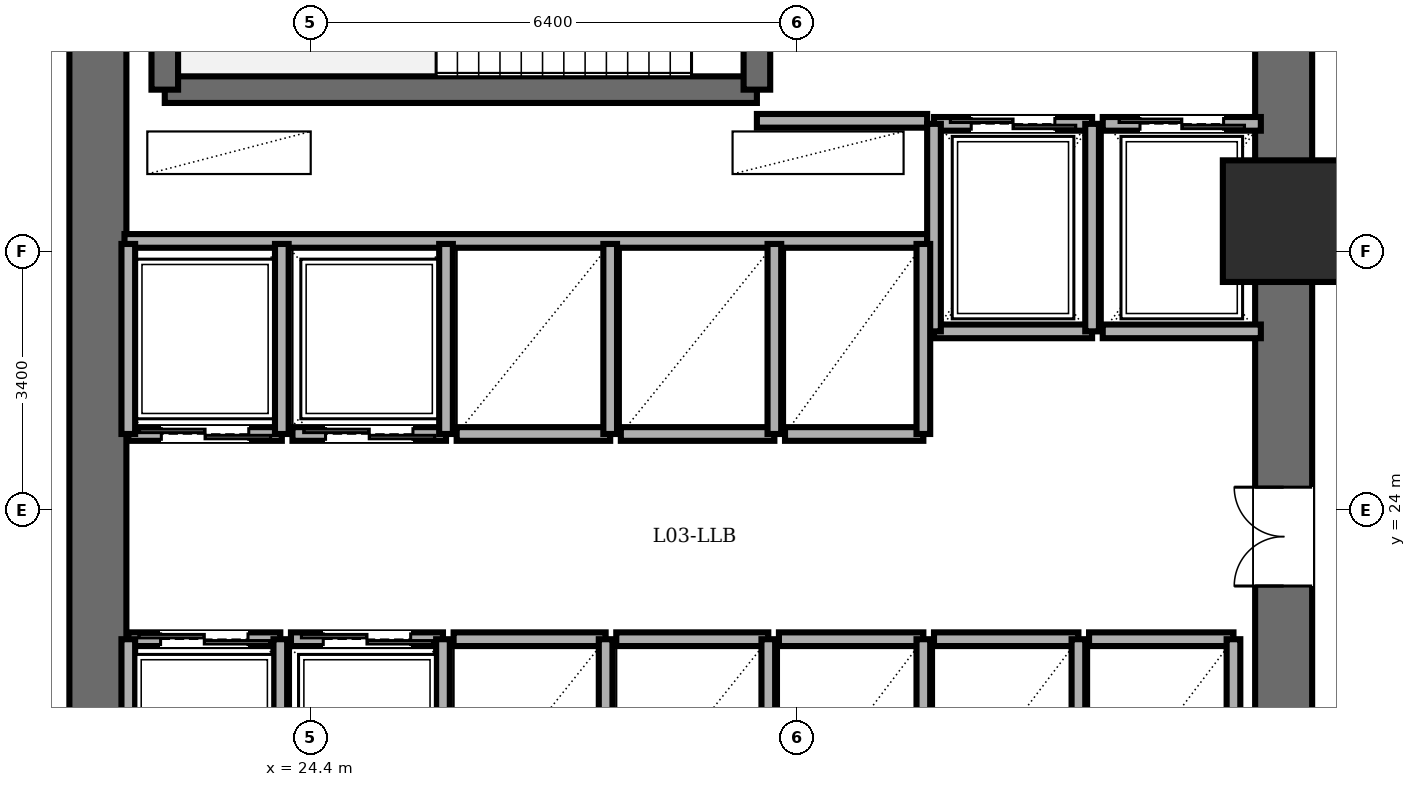
"""IFC4 building model, lengths in metres.
Left out: names, types, materials, properties, quantities, classifications, styles, units other than length and angle.
Written with IfcOpenShell. Run it as: python <this file> out.ifc"""

import sys

from ifc_helpers import new_model, si_unit, direction, frame, frame_2d, origin, origin_2d, place, context, subcontext, project, spatial, rectangle, extrude, element, fill, save


model = new_model("IFC4")
c1 = context("Model", 3, precision=1e-05, world=origin(), true_north=direction((0.0, 1.0)))
c2 = subcontext(c1, "Body", "Model", "MODEL_VIEW")
j1 = project(units=[si_unit("LENGTHUNIT", "METRE"), si_unit("PLANEANGLEUNIT", "RADIAN")], contexts=[c1])
p1 = place(None, origin())
s1 = spatial("IfcSite", under=j1, at=p1, CompositionType="ELEMENT")
p2 = place(p1, origin())
s2 = spatial("IfcBuilding", under=s1, at=p2, CompositionType="ELEMENT")
p3 = place(p2, frame((0.0, 0.0, 10.05)))
s3 = spatial("IfcBuildingStorey", under=s2, at=p3, CompositionType="ELEMENT", Elevation=10.05)
p4 = place(p3, frame((37.2, 27.8, 0.0), z_axis=(0.0, 0.0, 1.0), x_axis=(1.0, 0.0, 0.0)))
e1 = element("IfcColumn", 1, at=p4, inside=s3, PredefinedType="COLUMN", context=c2, shape_type="SweptSolid", body=[
    extrude(rectangle(XDim=1.6, YDim=1.6, at=origin_2d()), origin(), (0.0, 0.0, 1.0), 4.65),
])
p5 = place(p3, frame((21.6, 14.4, 0.0), z_axis=(0.0, 0.0, 1.0), x_axis=(0.0, 1.0, 0.0)))
e2 = element("IfcWall", 2, at=p5, inside=s3, PredefinedType="SHEAR", context=c2, shape_type="SweptSolid", body=[
    extrude(rectangle(XDim=19.2, YDim=0.75, at=frame_2d((9.6, 0.0))), origin(), (0.0, 0.0, 1.0), 4.43),
])
p6 = place(p3, frame((37.2, 14.4, 0.0), z_axis=(0.0, 0.0, 1.0), x_axis=(0.0, 1.0, 0.0)))
e3 = element("IfcWall", 3, at=p6, inside=s3, PredefinedType="SHEAR", context=c2, shape_type="SweptSolid", body=[
    extrude(rectangle(XDim=19.2, YDim=0.75, at=frame_2d((9.6, 0.0))), origin(), (0.0, 0.0, 1.0), 4.43),
])
p7 = place(p6, frame((15.8, 0.0, 0.0)))
e4 = element("IfcOpeningElement", 4, at=p7, cuts=e3, PredefinedType="OPENING", context=c2, shape_type="SweptSolid", body=[
    extrude(rectangle(XDim=1.15, YDim=2.15, at=frame_2d((0.575, 1.075))), frame((0.0, 0.385, 0.0), z_axis=(0.0, -1.0, 0.0), x_axis=(1.0, 0.0, 0.0)), (0.0, 0.0, 1.0), 0.77),
])
p8 = place(p6, frame((3.6, 0.0, 0.0)))
e5 = element("IfcOpeningElement", 5, at=p8, cuts=e3, PredefinedType="OPENING", context=c2, shape_type="SweptSolid", body=[
    extrude(rectangle(XDim=1.1, YDim=2.15, at=frame_2d((0.55, 1.075))), frame((0.0, 0.385, 0.0), z_axis=(0.0, -1.0, 0.0), x_axis=(1.0, 0.0, 0.0)), (0.0, 0.0, 1.0), 0.77),
])
p9 = place(p6, frame((8.6, 0.0, 0.0)))
e6 = element("IfcOpeningElement", 6, at=p9, cuts=e3, PredefinedType="OPENING", context=c2, shape_type="SweptSolid", body=[
    extrude(rectangle(XDim=1.3, YDim=2.2, at=frame_2d((0.65, 1.1))), frame((0.0, 0.385, 0.0), z_axis=(0.0, -1.0, 0.0), x_axis=(1.0, 0.0, 0.0)), (0.0, 0.0, 1.0), 0.77),
])
p10 = place(p3, frame((22.48, 29.53, 0.0), z_axis=(0.0, 0.0, 1.0), x_axis=(1.0, 0.0, 0.0)))
e7 = element("IfcWall", 7, at=p10, inside=s3, PredefinedType="SOLIDWALL", context=c2, shape_type="SweptSolid", body=[
    extrude(rectangle(XDim=7.79, YDim=0.35, at=frame_2d((3.895, 0.0))), origin(), (0.0, 0.0, 1.0), 4.43),
])
p11 = place(p3, frame((22.48, 29.53, 0.0), z_axis=(0.0, 0.0, 1.0), x_axis=(0.0, 1.0, 0.0)))
e8 = element("IfcWall", 8, at=p11, inside=s3, PredefinedType="SOLIDWALL", context=c2, shape_type="SweptSolid", body=[
    extrude(rectangle(XDim=3.58, YDim=0.35, at=frame_2d((1.79, 0.0))), origin(), (0.0, 0.0, 1.0), 4.43),
])
p12 = place(p3, frame((30.27, 29.53, 0.0), z_axis=(0.0, 0.0, 1.0), x_axis=(0.0, 1.0, 0.0)))
e9 = element("IfcWall", 9, at=p12, inside=s3, PredefinedType="SOLIDWALL", context=c2, shape_type="SweptSolid", body=[
    extrude(rectangle(XDim=3.58, YDim=0.35, at=frame_2d((1.79, 0.0))), origin(), (0.0, 0.0, 1.0), 4.43),
])
p13 = place(p12, frame((1.25, 0.0, 0.0)))
e10 = element("IfcOpeningElement", 10, at=p13, cuts=e9, PredefinedType="OPENING", context=c2, shape_type="SweptSolid", body=[
    extrude(rectangle(XDim=1.1, YDim=2.15, at=frame_2d((0.55, 1.075))), frame((0.0, 0.185, 0.0), z_axis=(0.0, -1.0, 0.0), x_axis=(1.0, 0.0, 0.0)), (0.0, 0.0, 1.0), 0.37),
])
p14 = place(p3, frame((30.27, 29.12, 0.0), z_axis=(0.0, 0.0, 1.0), x_axis=(1.0, 0.0, 0.0)))
e11 = element("IfcWall", 11, at=p14, inside=s3, PredefinedType="PARTITIONING", context=c2, shape_type="SweptSolid", body=[
    extrude(rectangle(XDim=2.24, YDim=0.18, at=frame_2d((1.12, 0.0))), origin(), (0.0, 0.0, 1.0), 4.43),
])
p15 = place(p3, frame((21.95, 27.54, 0.0), z_axis=(0.0, 0.0, 1.0), x_axis=(1.0, 0.0, 0.0)))
e12 = element("IfcWall", 12, at=p15, inside=s3, PredefinedType="PARTITIONING", context=c2, shape_type="SweptSolid", body=[
    extrude(rectangle(XDim=10.56, YDim=0.18, at=frame_2d((5.28, 0.0))), origin(), (0.0, 0.0, 1.0), 4.43),
])
p16 = place(p3, frame((32.6, 29.08, 0.0), z_axis=(0.0, 0.0, 1.0), x_axis=(1.0, 0.0, 0.0)))
e13 = element("IfcWall", 13, at=p16, inside=s3, PredefinedType="PARTITIONING", context=c2, shape_type="SweptSolid", body=[
    extrude(rectangle(XDim=2.08, YDim=0.18, at=frame_2d((1.04, 0.0))), origin(), (0.0, 0.0, 1.0), 4.43),
])
p17 = place(p16, frame((0.49, 0.0, 0.0)))
e14 = element("IfcOpeningElement", 14, at=p17, cuts=e13, PredefinedType="OPENING", context=c2, shape_type="SweptSolid", body=[
    extrude(rectangle(XDim=1.1, YDim=2.2, at=frame_2d((0.55, 1.1))), frame((0.0, 0.1, 0.0), z_axis=(0.0, -1.0, 0.0), x_axis=(1.0, 0.0, 0.0)), (0.0, 0.0, 1.0), 0.2),
])
p18 = place(p3, frame((34.68, 26.35, 0.0), z_axis=(0.0, 0.0, 1.0), x_axis=(-1.0, 0.0, 0.0)))
e15 = element("IfcWall", 15, at=p18, inside=s3, PredefinedType="PARTITIONING", context=c2, shape_type="SweptSolid", body=[
    extrude(rectangle(XDim=2.08, YDim=0.18, at=frame_2d((1.04, 0.0))), origin(), (0.0, 0.0, 1.0), 4.43),
])
for number, where, z_axis, x_axis in (
    (16, (34.68, 26.35, 0.0), (0.0, 0.0, 1.0), (0.0, 1.0, 0.0)),
    (17, (32.6, 29.08, 0.0), (0.0, 0.0, 1.0), (0.0, -1.0, 0.0)),
):
    element("IfcWall", number, at=place(p3, frame(where, z_axis=z_axis, x_axis=x_axis)), inside=s3, PredefinedType="PARTITIONING", context=c2, shape_type="SweptSolid", body=[
        extrude(rectangle(XDim=2.73, YDim=0.18, at=frame_2d((1.365, 0.0))), origin(), (0.0, 0.0, 1.0), 4.43),
    ])
p19 = place(p3, frame((34.82, 29.08, 0.0), z_axis=(0.0, 0.0, 1.0), x_axis=(1.0, 0.0, 0.0)))
e18 = element("IfcWall", 18, at=p19, inside=s3, PredefinedType="PARTITIONING", context=c2, shape_type="SweptSolid", body=[
    extrude(rectangle(XDim=2.08, YDim=0.18, at=frame_2d((1.04, 0.0))), origin(), (0.0, 0.0, 1.0), 4.43),
])
p20 = place(p19, frame((0.49, 0.0, 0.0)))
e19 = element("IfcOpeningElement", 19, at=p20, cuts=e18, PredefinedType="OPENING", context=c2, shape_type="SweptSolid", body=[
    extrude(rectangle(XDim=1.1, YDim=2.2, at=frame_2d((0.55, 1.1))), frame((0.0, 0.1, 0.0), z_axis=(0.0, -1.0, 0.0), x_axis=(1.0, 0.0, 0.0)), (0.0, 0.0, 1.0), 0.2),
])
p21 = place(p3, frame((36.9, 26.35, 0.0), z_axis=(0.0, 0.0, 1.0), x_axis=(-1.0, 0.0, 0.0)))
e20 = element("IfcWall", 20, at=p21, inside=s3, PredefinedType="PARTITIONING", context=c2, shape_type="SweptSolid", body=[
    extrude(rectangle(XDim=2.08, YDim=0.18, at=frame_2d((1.04, 0.0))), origin(), (0.0, 0.0, 1.0), 4.43),
])
p22 = place(p3, frame((24.02, 25.0, 0.0), z_axis=(0.0, 0.0, 1.0), x_axis=(-1.0, 0.0, 0.0)))
e21 = element("IfcWall", 21, at=p22, inside=s3, PredefinedType="PARTITIONING", context=c2, shape_type="SweptSolid", body=[
    extrude(rectangle(XDim=2.02, YDim=0.18, at=frame_2d((1.01, 0.0))), origin(), (0.0, 0.0, 1.0), 4.43),
])
p23 = place(p22, frame((0.435, 0.0, 0.0)))
e22 = element("IfcOpeningElement", 22, at=p23, cuts=e21, PredefinedType="OPENING", context=c2, shape_type="SweptSolid", body=[
    extrude(rectangle(XDim=1.15, YDim=2.2, at=frame_2d((0.575, 1.1))), frame((0.0, 0.1, 0.0), z_axis=(0.0, -1.0, 0.0), x_axis=(1.0, 0.0, 0.0)), (0.0, 0.0, 1.0), 0.2),
])
for number, where, z_axis, x_axis in (
    (23, (24.02, 25.0, 0.0), (0.0, 0.0, 1.0), (0.0, 1.0, 0.0)),
    (24, (22.0, 27.5, 0.0), (0.0, 0.0, 1.0), (0.0, -1.0, 0.0)),
):
    element("IfcWall", number, at=place(p3, frame(where, z_axis=z_axis, x_axis=x_axis)), inside=s3, PredefinedType="PARTITIONING", context=c2, shape_type="SweptSolid", body=[
        extrude(rectangle(XDim=2.5, YDim=0.18, at=frame_2d((1.25, 0.0))), origin(), (0.0, 0.0, 1.0), 4.43),
    ])
p24 = place(p3, frame((26.18, 25.0, 0.0), z_axis=(0.0, 0.0, 1.0), x_axis=(-1.0, 0.0, 0.0)))
e25 = element("IfcWall", 25, at=p24, inside=s3, PredefinedType="PARTITIONING", context=c2, shape_type="SweptSolid", body=[
    extrude(rectangle(XDim=2.02, YDim=0.18, at=frame_2d((1.01, 0.0))), origin(), (0.0, 0.0, 1.0), 4.43),
])
p25 = place(p24, frame((0.435, 0.0, 0.0)))
e26 = element("IfcOpeningElement", 26, at=p25, cuts=e25, PredefinedType="OPENING", context=c2, shape_type="SweptSolid", body=[
    extrude(rectangle(XDim=1.15, YDim=2.2, at=frame_2d((0.575, 1.1))), frame((0.0, 0.1, 0.0), z_axis=(0.0, -1.0, 0.0), x_axis=(1.0, 0.0, 0.0)), (0.0, 0.0, 1.0), 0.2),
])
p26 = place(p3, frame((26.18, 25.0, 0.0), z_axis=(0.0, 0.0, 1.0), x_axis=(0.0, 1.0, 0.0)))
e27 = element("IfcWall", 27, at=p26, inside=s3, PredefinedType="PARTITIONING", context=c2, shape_type="SweptSolid", body=[
    extrude(rectangle(XDim=2.5, YDim=0.18, at=frame_2d((1.25, 0.0))), origin(), (0.0, 0.0, 1.0), 4.43),
])
p27 = place(p3, frame((22.0, 22.3, 0.0), z_axis=(0.0, 0.0, 1.0), x_axis=(1.0, 0.0, 0.0)))
e28 = element("IfcWall", 28, at=p27, inside=s3, PredefinedType="PARTITIONING", context=c2, shape_type="SweptSolid", body=[
    extrude(rectangle(XDim=2.0, YDim=0.18, at=frame_2d((1.0, 0.0))), origin(), (0.0, 0.0, 1.0), 4.43),
])
p28 = place(p27, frame((0.425, 0.0, 0.0)))
e29 = element("IfcOpeningElement", 29, at=p28, cuts=e28, PredefinedType="OPENING", context=c2, shape_type="SweptSolid", body=[
    extrude(rectangle(XDim=1.15, YDim=2.2, at=frame_2d((0.575, 1.1))), frame((0.0, 0.1, 0.0), z_axis=(0.0, -1.0, 0.0), x_axis=(1.0, 0.0, 0.0)), (0.0, 0.0, 1.0), 0.2),
])
for number, where, z_axis, x_axis in (
    (30, (24.0, 19.8, 0.0), (0.0, 0.0, 1.0), (0.0, 1.0, 0.0)),
    (31, (22.0, 22.3, 0.0), (0.0, 0.0, 1.0), (0.0, -1.0, 0.0)),
):
    element("IfcWall", number, at=place(p3, frame(where, z_axis=z_axis, x_axis=x_axis)), inside=s3, PredefinedType="PARTITIONING", context=c2, shape_type="SweptSolid", body=[
        extrude(rectangle(XDim=2.5, YDim=0.18, at=frame_2d((1.25, 0.0))), origin(), (0.0, 0.0, 1.0), 4.43),
    ])
p29 = place(p3, frame((24.14, 22.3, 0.0), z_axis=(0.0, 0.0, 1.0), x_axis=(1.0, 0.0, 0.0)))
e32 = element("IfcWall", 32, at=p29, inside=s3, PredefinedType="PARTITIONING", context=c2, shape_type="SweptSolid", body=[
    extrude(rectangle(XDim=2.0, YDim=0.18, at=frame_2d((1.0, 0.0))), origin(), (0.0, 0.0, 1.0), 4.43),
])
p30 = place(p29, frame((0.425, 0.0, 0.0)))
e33 = element("IfcOpeningElement", 33, at=p30, cuts=e32, PredefinedType="OPENING", context=c2, shape_type="SweptSolid", body=[
    extrude(rectangle(XDim=1.15, YDim=2.2, at=frame_2d((0.575, 1.1))), frame((0.0, 0.1, 0.0), z_axis=(0.0, -1.0, 0.0), x_axis=(1.0, 0.0, 0.0)), (0.0, 0.0, 1.0), 0.2),
])
p31 = place(p3, frame((26.14, 19.8, 0.0), z_axis=(0.0, 0.0, 1.0), x_axis=(0.0, 1.0, 0.0)))
e34 = element("IfcWall", 34, at=p31, inside=s3, PredefinedType="PARTITIONING", context=c2, shape_type="SweptSolid", body=[
    extrude(rectangle(XDim=2.5, YDim=0.18, at=frame_2d((1.25, 0.0))), origin(), (0.0, 0.0, 1.0), 4.43),
])
p32 = place(p3, frame((28.34, 25.0, 0.0), z_axis=(0.0, 0.0, 1.0), x_axis=(-1.0, 0.0, 0.0)))
e35 = element("IfcWall", 35, at=p32, inside=s3, PredefinedType="PARTITIONING", context=c2, shape_type="SweptSolid", body=[
    extrude(rectangle(XDim=2.02, YDim=0.18, at=frame_2d((1.01, 0.0))), origin(), (0.0, 0.0, 1.0), 4.43),
])
p33 = place(p3, frame((28.34, 25.0, 0.0), z_axis=(0.0, 0.0, 1.0), x_axis=(0.0, 1.0, 0.0)))
e36 = element("IfcWall", 36, at=p33, inside=s3, PredefinedType="PARTITIONING", context=c2, shape_type="SweptSolid", body=[
    extrude(rectangle(XDim=2.5, YDim=0.18, at=frame_2d((1.25, 0.0))), origin(), (0.0, 0.0, 1.0), 4.43),
])
p34 = place(p3, frame((30.5, 25.0, 0.0), z_axis=(0.0, 0.0, 1.0), x_axis=(-1.0, 0.0, 0.0)))
e37 = element("IfcWall", 37, at=p34, inside=s3, PredefinedType="PARTITIONING", context=c2, shape_type="SweptSolid", body=[
    extrude(rectangle(XDim=2.02, YDim=0.18, at=frame_2d((1.01, 0.0))), origin(), (0.0, 0.0, 1.0), 4.43),
])
p35 = place(p3, frame((30.5, 25.0, 0.0), z_axis=(0.0, 0.0, 1.0), x_axis=(0.0, 1.0, 0.0)))
e38 = element("IfcWall", 38, at=p35, inside=s3, PredefinedType="PARTITIONING", context=c2, shape_type="SweptSolid", body=[
    extrude(rectangle(XDim=2.5, YDim=0.18, at=frame_2d((1.25, 0.0))), origin(), (0.0, 0.0, 1.0), 4.43),
])
p36 = place(p3, frame((26.28, 22.3, 0.0), z_axis=(0.0, 0.0, 1.0), x_axis=(1.0, 0.0, 0.0)))
e39 = element("IfcWall", 39, at=p36, inside=s3, PredefinedType="PARTITIONING", context=c2, shape_type="SweptSolid", body=[
    extrude(rectangle(XDim=2.0, YDim=0.18, at=frame_2d((1.0, 0.0))), origin(), (0.0, 0.0, 1.0), 4.43),
])
p37 = place(p3, frame((28.28, 19.8, 0.0), z_axis=(0.0, 0.0, 1.0), x_axis=(0.0, 1.0, 0.0)))
e40 = element("IfcWall", 40, at=p37, inside=s3, PredefinedType="PARTITIONING", context=c2, shape_type="SweptSolid", body=[
    extrude(rectangle(XDim=2.5, YDim=0.18, at=frame_2d((1.25, 0.0))), origin(), (0.0, 0.0, 1.0), 4.43),
])
p38 = place(p3, frame((28.42, 22.3, 0.0), z_axis=(0.0, 0.0, 1.0), x_axis=(1.0, 0.0, 0.0)))
e41 = element("IfcWall", 41, at=p38, inside=s3, PredefinedType="PARTITIONING", context=c2, shape_type="SweptSolid", body=[
    extrude(rectangle(XDim=2.0, YDim=0.18, at=frame_2d((1.0, 0.0))), origin(), (0.0, 0.0, 1.0), 4.43),
])
p39 = place(p3, frame((30.42, 19.8, 0.0), z_axis=(0.0, 0.0, 1.0), x_axis=(0.0, 1.0, 0.0)))
e42 = element("IfcWall", 42, at=p39, inside=s3, PredefinedType="PARTITIONING", context=c2, shape_type="SweptSolid", body=[
    extrude(rectangle(XDim=2.5, YDim=0.18, at=frame_2d((1.25, 0.0))), origin(), (0.0, 0.0, 1.0), 4.43),
])
p40 = place(p3, frame((32.46, 25.0, 0.0), z_axis=(0.0, 0.0, 1.0), x_axis=(-1.0, 0.0, 0.0)))
e43 = element("IfcWall", 43, at=p40, inside=s3, PredefinedType="PARTITIONING", context=c2, shape_type="SweptSolid", body=[
    extrude(rectangle(XDim=1.82, YDim=0.18, at=frame_2d((0.91, 0.0))), origin(), (0.0, 0.0, 1.0), 4.43),
])
p41 = place(p3, frame((32.46, 25.0, 0.0), z_axis=(0.0, 0.0, 1.0), x_axis=(0.0, 1.0, 0.0)))
e44 = element("IfcWall", 44, at=p41, inside=s3, PredefinedType="PARTITIONING", context=c2, shape_type="SweptSolid", body=[
    extrude(rectangle(XDim=2.5, YDim=0.18, at=frame_2d((1.25, 0.0))), origin(), (0.0, 0.0, 1.0), 4.43),
])
p42 = place(p3, frame((30.56, 22.3, 0.0), z_axis=(0.0, 0.0, 1.0), x_axis=(1.0, 0.0, 0.0)))
e45 = element("IfcWall", 45, at=p42, inside=s3, PredefinedType="PARTITIONING", context=c2, shape_type="SweptSolid", body=[
    extrude(rectangle(XDim=1.9, YDim=0.18, at=frame_2d((0.95, 0.0))), origin(), (0.0, 0.0, 1.0), 4.43),
])
p43 = place(p3, frame((32.46, 19.8, 0.0), z_axis=(0.0, 0.0, 1.0), x_axis=(0.0, 1.0, 0.0)))
e46 = element("IfcWall", 46, at=p43, inside=s3, PredefinedType="PARTITIONING", context=c2, shape_type="SweptSolid", body=[
    extrude(rectangle(XDim=2.5, YDim=0.18, at=frame_2d((1.25, 0.0))), origin(), (0.0, 0.0, 1.0), 4.43),
])
p44 = place(p3, frame((32.6, 22.3, 0.0), z_axis=(0.0, 0.0, 1.0), x_axis=(1.0, 0.0, 0.0)))
e47 = element("IfcWall", 47, at=p44, inside=s3, PredefinedType="PARTITIONING", context=c2, shape_type="SweptSolid", body=[
    extrude(rectangle(XDim=1.9, YDim=0.18, at=frame_2d((0.95, 0.0))), origin(), (0.0, 0.0, 1.0), 4.43),
])
p45 = place(p3, frame((34.5, 19.8, 0.0), z_axis=(0.0, 0.0, 1.0), x_axis=(0.0, 1.0, 0.0)))
e48 = element("IfcWall", 48, at=p45, inside=s3, PredefinedType="PARTITIONING", context=c2, shape_type="SweptSolid", body=[
    extrude(rectangle(XDim=2.5, YDim=0.18, at=frame_2d((1.25, 0.0))), origin(), (0.0, 0.0, 1.0), 4.43),
])
p46 = place(p3, frame((34.64, 22.3, 0.0), z_axis=(0.0, 0.0, 1.0), x_axis=(1.0, 0.0, 0.0)))
e49 = element("IfcWall", 49, at=p46, inside=s3, PredefinedType="PARTITIONING", context=c2, shape_type="SweptSolid", body=[
    extrude(rectangle(XDim=1.9, YDim=0.18, at=frame_2d((0.95, 0.0))), origin(), (0.0, 0.0, 1.0), 4.43),
])
p47 = place(p3, frame((36.54, 19.8, 0.0), z_axis=(0.0, 0.0, 1.0), x_axis=(0.0, 1.0, 0.0)))
e50 = element("IfcWall", 50, at=p47, inside=s3, PredefinedType="PARTITIONING", context=c2, shape_type="SweptSolid", body=[
    extrude(rectangle(XDim=2.5, YDim=0.18, at=frame_2d((1.25, 0.0))), origin(), (0.0, 0.0, 1.0), 4.43),
])
p48 = place(p17, origin())
e51 = element("IfcDoor", 51, at=p48, inside=s3, OperationType="DOUBLE_DOOR_SLIDING", PredefinedType="DOOR", context=c2, shape_type="SweptSolid", body=[
    extrude(rectangle(XDim=1.1, YDim=2.2, at=frame_2d((0.55, 1.1))), frame((0.0, 0.025, 0.0), z_axis=(0.0, -1.0, 0.0), x_axis=(1.0, 0.0, 0.0)), (0.0, 0.0, 1.0), 0.05),
])
fill(e14, e51)
p49 = place(p20, origin())
e52 = element("IfcDoor", 52, at=p49, inside=s3, OperationType="DOUBLE_DOOR_SLIDING", PredefinedType="DOOR", context=c2, shape_type="SweptSolid", body=[
    extrude(rectangle(XDim=1.1, YDim=2.2, at=frame_2d((0.55, 1.1))), frame((0.0, 0.025, 0.0), z_axis=(0.0, -1.0, 0.0), x_axis=(1.0, 0.0, 0.0)), (0.0, 0.0, 1.0), 0.05),
])
fill(e19, e52)
p50 = place(p23, origin())
e53 = element("IfcDoor", 53, at=p50, inside=s3, OperationType="DOUBLE_DOOR_SLIDING", PredefinedType="DOOR", context=c2, shape_type="SweptSolid", body=[
    extrude(rectangle(XDim=1.15, YDim=2.2, at=frame_2d((0.575, 1.1))), frame((0.0, 0.025, 0.0), z_axis=(0.0, -1.0, 0.0), x_axis=(1.0, 0.0, 0.0)), (0.0, 0.0, 1.0), 0.05),
])
fill(e22, e53)
p51 = place(p25, origin())
e54 = element("IfcDoor", 54, at=p51, inside=s3, OperationType="DOUBLE_DOOR_SLIDING", PredefinedType="DOOR", context=c2, shape_type="SweptSolid", body=[
    extrude(rectangle(XDim=1.15, YDim=2.2, at=frame_2d((0.575, 1.1))), frame((0.0, 0.025, 0.0), z_axis=(0.0, -1.0, 0.0), x_axis=(1.0, 0.0, 0.0)), (0.0, 0.0, 1.0), 0.05),
])
fill(e26, e54)
p52 = place(p28, origin())
e55 = element("IfcDoor", 55, at=p52, inside=s3, OperationType="DOUBLE_DOOR_SLIDING", PredefinedType="DOOR", context=c2, shape_type="SweptSolid", body=[
    extrude(rectangle(XDim=1.15, YDim=2.2, at=frame_2d((0.575, 1.1))), frame((0.0, 0.025, 0.0), z_axis=(0.0, -1.0, 0.0), x_axis=(1.0, 0.0, 0.0)), (0.0, 0.0, 1.0), 0.05),
])
fill(e29, e55)
p53 = place(p30, origin())
e56 = element("IfcDoor", 56, at=p53, inside=s3, OperationType="DOUBLE_DOOR_SLIDING", PredefinedType="DOOR", context=c2, shape_type="SweptSolid", body=[
    extrude(rectangle(XDim=1.15, YDim=2.2, at=frame_2d((0.575, 1.1))), frame((0.0, 0.025, 0.0), z_axis=(0.0, -1.0, 0.0), x_axis=(1.0, 0.0, 0.0)), (0.0, 0.0, 1.0), 0.05),
])
fill(e33, e56)
p54 = place(p9, origin())
e57 = element("IfcDoor", 57, at=p54, inside=s3, OperationType="DOUBLE_DOOR_SINGLE_SWING", PredefinedType="DOOR", context=c2, shape_type="SweptSolid", body=[
    extrude(rectangle(XDim=1.3, YDim=2.2, at=frame_2d((0.65, 1.1))), frame((0.0, 0.025, 0.0), z_axis=(0.0, -1.0, 0.0), x_axis=(1.0, 0.0, 0.0)), (0.0, 0.0, 1.0), 0.05),
])
fill(e6, e57)
save(model, sys.argv[1])
